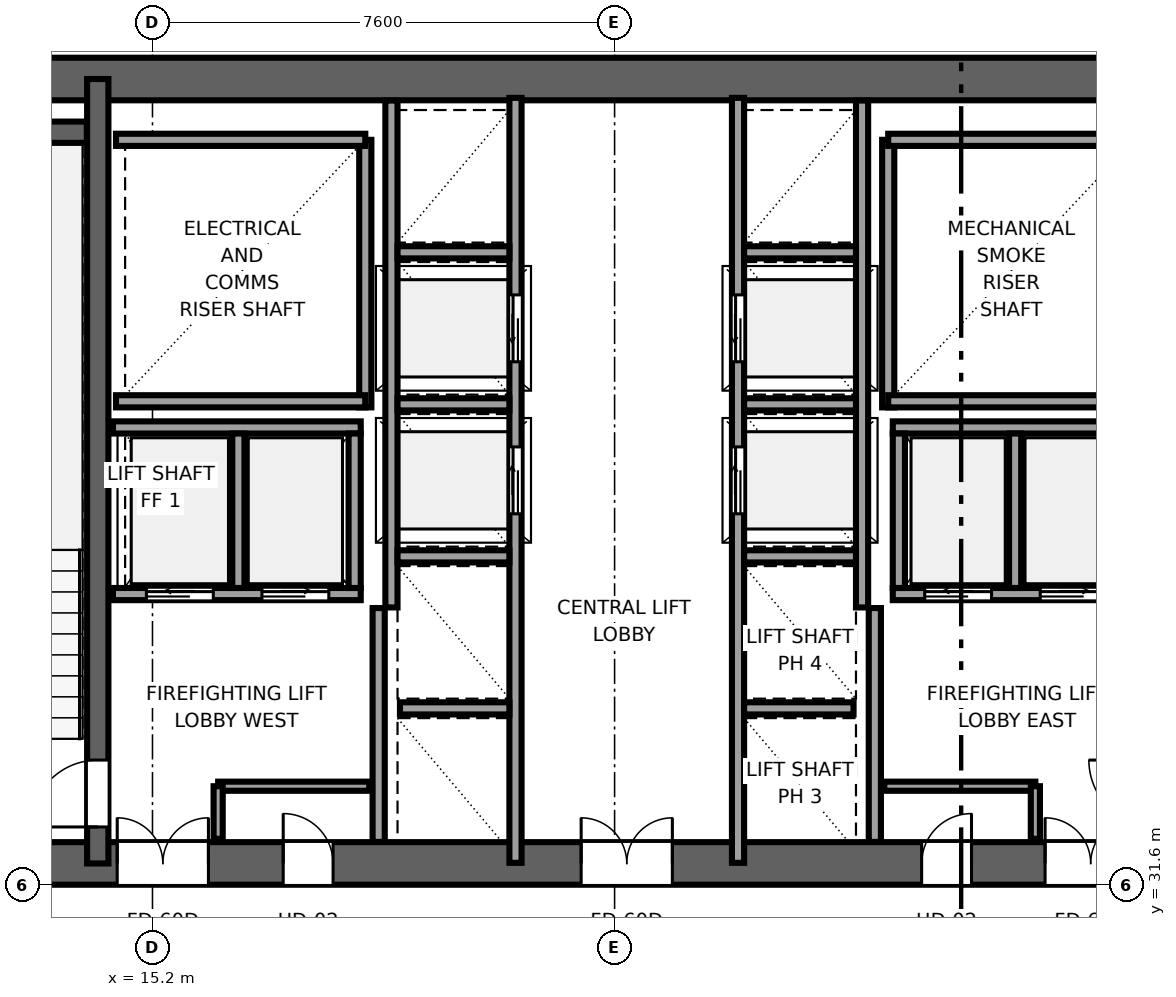
"""IFC4 building model, lengths in metres.
Left out: names, types, materials, properties, quantities, classifications, styles, units other than length and angle.
Written with IfcOpenShell. Run it as: python <this file> out.ifc"""

import sys

from ifc_helpers import new_model, si_unit, direction, frame, frame_2d, origin, place, context, subcontext, project, spatial, rectangle, extrude, source, transform, mapped, element, fill, save


model = new_model("IFC4")
c1 = context("Model", 3, precision=1e-05, world=origin(), true_north=direction((0.0, 1.0)))
c2 = subcontext(c1, "Body", "Model", "MODEL_VIEW")
j1 = project(units=[si_unit("LENGTHUNIT", "METRE"), si_unit("PLANEANGLEUNIT", "RADIAN")], contexts=[c1])
p1 = place(None, origin())
s1 = spatial("IfcSite", under=j1, at=p1, CompositionType="ELEMENT")
p2 = place(p1, origin())
s2 = spatial("IfcBuilding", under=s1, at=p2, CompositionType="ELEMENT")
p3 = place(p2, frame((0.0, 0.0, 136.4)))
s3 = spatial("IfcBuildingStorey", under=s2, at=p3, CompositionType="ELEMENT", Elevation=136.4)
p4 = place(p3, frame((9.8, 31.95, 0.0), z_axis=(0.0, 0.0, 1.0), x_axis=(1.0, 0.0, 0.0)))
e1 = element("IfcWall", 1, at=p4, inside=s3, PredefinedType="SHEAR", context=c2, shape_type="SweptSolid", body=[
    extrude(rectangle(XDim=26.4, YDim=0.7, at=frame_2d((13.2, 0.0))), origin(), (0.0, 0.0, 1.0), 3.55),
])
p5 = place(p4, frame((6.32, 0.0, 0.0), z_axis=(0.0, 0.0, 1.0), x_axis=(-1.0, 0.0, 0.0)))
e2 = element("IfcOpeningElement", 2, at=p5, cuts=e1, PredefinedType="OPENING", context=c2, shape_type="SweptSolid", body=[
    extrude(rectangle(XDim=1.5, YDim=2.04, at=frame_2d((0.75, 1.02))), frame((0.0, 0.36, 0.0), z_axis=(0.0, -1.0, 0.0), x_axis=(1.0, 0.0, 0.0)), (0.0, 0.0, 1.0), 0.72),
])
p6 = place(p4, frame((13.95, 0.0, 0.0), z_axis=(0.0, 0.0, 1.0), x_axis=(-1.0, 0.0, 0.0)))
e3 = element("IfcOpeningElement", 3, at=p6, cuts=e1, PredefinedType="OPENING", context=c2, shape_type="SweptSolid", body=[
    extrude(rectangle(XDim=1.5, YDim=2.04, at=frame_2d((0.75, 1.02))), frame((0.0, 0.36, 0.0), z_axis=(0.0, -1.0, 0.0), x_axis=(1.0, 0.0, 0.0)), (0.0, 0.0, 1.0), 0.72),
])
p7 = place(p4, frame((21.58, 0.0, 0.0), z_axis=(0.0, 0.0, 1.0), x_axis=(-1.0, 0.0, 0.0)))
e4 = element("IfcOpeningElement", 4, at=p7, cuts=e1, PredefinedType="OPENING", context=c2, shape_type="SweptSolid", body=[
    extrude(rectangle(XDim=1.5, YDim=2.04, at=frame_2d((0.75, 1.02))), frame((0.0, 0.36, 0.0), z_axis=(0.0, -1.0, 0.0), x_axis=(1.0, 0.0, 0.0)), (0.0, 0.0, 1.0), 0.72),
])
p8 = place(p4, frame((8.37, 0.0, 0.0), z_axis=(0.0, 0.0, 1.0), x_axis=(-1.0, 0.0, 0.0)))
e5 = element("IfcOpeningElement", 5, at=p8, cuts=e1, PredefinedType="OPENING", context=c2, shape_type="SweptSolid", body=[
    extrude(rectangle(XDim=0.82, YDim=2.01, at=frame_2d((0.41, 1.005))), frame((0.0, 0.36, 0.0), z_axis=(0.0, -1.0, 0.0), x_axis=(1.0, 0.0, 0.0)), (0.0, 0.0, 1.0), 0.72),
])
p9 = place(p4, frame((18.87, 0.0, 0.0), z_axis=(0.0, 0.0, 1.0), x_axis=(-1.0, 0.0, 0.0)))
e6 = element("IfcOpeningElement", 6, at=p9, cuts=e1, PredefinedType="OPENING", context=c2, shape_type="SweptSolid", body=[
    extrude(rectangle(XDim=0.82, YDim=2.01, at=frame_2d((0.41, 1.005))), frame((0.0, 0.36, 0.0), z_axis=(0.0, -1.0, 0.0), x_axis=(1.0, 0.0, 0.0)), (0.0, 0.0, 1.0), 0.72),
])
p10 = place(p3, frame((9.8, 44.85, 0.0), z_axis=(0.0, 0.0, 1.0), x_axis=(1.0, 0.0, 0.0)))
e7 = element("IfcWall", 7, at=p10, inside=s3, PredefinedType="SHEAR", context=c2, shape_type="SweptSolid", body=[
    extrude(rectangle(XDim=26.4, YDim=0.7, at=frame_2d((13.2, 0.0))), origin(), (0.0, 0.0, 1.0), 3.55),
])
p11 = place(p3, frame((14.3, 31.95, 0.0), z_axis=(0.0, 0.0, 1.0), x_axis=(0.0, 1.0, 0.0)))
e8 = element("IfcWall", 8, at=p11, inside=s3, PredefinedType="SHEAR", context=c2, shape_type="SweptSolid", body=[
    extrude(rectangle(XDim=12.9, YDim=0.35, at=frame_2d((6.45, 0.0))), origin(), (0.0, 0.0, 1.0), 3.55),
])
p12 = place(p11, frame((0.6, 0.0, 0.0)))
e9 = element("IfcOpeningElement", 9, at=p12, cuts=e8, PredefinedType="OPENING", context=c2, shape_type="SweptSolid", body=[
    extrude(rectangle(XDim=1.1, YDim=2.12, at=frame_2d((0.55, 1.06))), frame((0.0, 0.185, 0.0), z_axis=(0.0, -1.0, 0.0), x_axis=(1.0, 0.0, 0.0)), (0.0, 0.0, 1.0), 0.37),
])
p13 = place(p3, frame((10.52, 43.975, 0.0), z_axis=(0.0, 0.0, 1.0), x_axis=(1.0, 0.0, 0.0)))
e10 = element("IfcWall", 10, at=p13, inside=s3, PredefinedType="SHEAR", context=c2, shape_type="SweptSolid", body=[
    extrude(rectangle(XDim=3.6, YDim=0.35, at=frame_2d((1.8, 0.0))), origin(), (0.0, 0.0, 1.0), 3.55),
])
p14 = place(p3, frame((18.7, 39.45, 0.0), z_axis=(0.0, 0.0, 1.0), x_axis=(0.0, 1.0, 0.0)))
e11 = element("IfcWall", 11, at=p14, inside=s3, PredefinedType="SOLIDWALL", context=c2, shape_type="SweptSolid", body=[
    extrude(rectangle(XDim=4.4, YDim=0.2, at=frame_2d((2.2, 0.0))), origin(), (0.0, 0.0, 1.0), 3.37),
])
for number, where, z_axis, x_axis in (
    (12, (14.6, 39.55, 0.0), (0.0, 0.0, 1.0), (1.0, 0.0, 0.0)),
    (13, (14.6, 43.85, 0.0), (0.0, 0.0, 1.0), (1.0, 0.0, 0.0)),
):
    element("IfcWall", number, at=place(p3, frame(where, z_axis=z_axis, x_axis=x_axis)), inside=s3, PredefinedType="SOLIDWALL", context=c2, shape_type="SweptSolid", body=[
        extrude(rectangle(XDim=4.1, YDim=0.2, at=frame_2d((2.05, 0.0))), origin(), (0.0, 0.0, 1.0), 3.37),
    ])
p15 = place(p3, frame((27.3, 39.45, 0.0), z_axis=(0.0, 0.0, 1.0), x_axis=(0.0, 1.0, 0.0)))
e14 = element("IfcWall", 14, at=p15, inside=s3, PredefinedType="SOLIDWALL", context=c2, shape_type="SweptSolid", body=[
    extrude(rectangle(XDim=4.4, YDim=0.2, at=frame_2d((2.2, 0.0))), origin(), (0.0, 0.0, 1.0), 3.37),
])
for number, where, z_axis, x_axis in (
    (15, (27.3, 39.55, 0.0), (0.0, 0.0, 1.0), (1.0, 0.0, 0.0)),
    (16, (27.3, 43.85, 0.0), (0.0, 0.0, 1.0), (1.0, 0.0, 0.0)),
):
    element("IfcWall", number, at=place(p3, frame(where, z_axis=z_axis, x_axis=x_axis)), inside=s3, PredefinedType="SOLIDWALL", context=c2, shape_type="SweptSolid", body=[
        extrude(rectangle(XDim=4.1, YDim=0.2, at=frame_2d((2.05, 0.0))), origin(), (0.0, 0.0, 1.0), 3.37),
    ])
for number, where, z_axis, x_axis in (
    (17, (18.92, 32.304, 0.0), (0.0, 0.0, 1.0), (0.0, 1.0, 0.0)),
    (18, (27.08, 32.304, 0.0), (0.0, 0.0, 1.0), (0.0, 1.0, 0.0)),
):
    element("IfcWall", number, at=place(p3, frame(where, z_axis=z_axis, x_axis=x_axis)), inside=s3, PredefinedType="SOLIDWALL", context=c2, shape_type="SweptSolid", body=[
        extrude(rectangle(XDim=3.846, YDim=0.2, at=frame_2d((1.923, 0.0))), origin(), (0.0, 0.0, 1.0), 3.37),
    ])
p16 = place(p3, frame((21.17, 31.96, 0.0), z_axis=(0.0, 0.0, 1.0), x_axis=(0.0, 1.0, 0.0)))
e19 = element("IfcWall", 19, at=p16, inside=s3, PredefinedType="SOLIDWALL", context=c2, shape_type="SweptSolid", body=[
    extrude(rectangle(XDim=12.58, YDim=0.2, at=frame_2d((6.29, 0.0))), origin(), (0.0, 0.0, 1.0), 3.37),
])
p17 = place(p16, frame((5.74, 0.0, 0.0)))
e20 = element("IfcOpeningElement", 20, at=p17, cuts=e19, PredefinedType="OPENING", context=c2, shape_type="SweptSolid", body=[
    extrude(rectangle(XDim=1.1, YDim=2.12, at=frame_2d((0.55, 1.06))), frame((0.0, 0.11, 0.0), z_axis=(0.0, -1.0, 0.0), x_axis=(1.0, 0.0, 0.0)), (0.0, 0.0, 1.0), 0.22),
])
p18 = place(p16, frame((8.24, 0.0, 0.0)))
e21 = element("IfcOpeningElement", 21, at=p18, cuts=e19, PredefinedType="OPENING", context=c2, shape_type="SweptSolid", body=[
    extrude(rectangle(XDim=1.1, YDim=2.12, at=frame_2d((0.55, 1.06))), frame((0.0, 0.11, 0.0), z_axis=(0.0, -1.0, 0.0), x_axis=(1.0, 0.0, 0.0)), (0.0, 0.0, 1.0), 0.22),
])
p19 = place(p3, frame((19.13, 36.16, 0.0), z_axis=(0.0, 0.0, 1.0), x_axis=(0.0, 1.0, 0.0)))
e22 = element("IfcWall", 22, at=p19, inside=s3, PredefinedType="SOLIDWALL", context=c2, shape_type="SweptSolid", body=[
    extrude(rectangle(XDim=8.336, YDim=0.2, at=frame_2d((4.168, 0.0))), origin(), (0.0, 0.0, 1.0), 3.37),
])
p20 = place(p3, frame((19.27, 34.5, 0.0), z_axis=(0.0, 0.0, 1.0), x_axis=(1.0, 0.0, 0.0)))
e23 = element("IfcWall", 23, at=p20, inside=s3, PredefinedType="SOLIDWALL", context=c2, shape_type="SweptSolid", body=[
    extrude(rectangle(XDim=1.8, YDim=0.2, at=frame_2d((0.9, 0.0))), origin(), (0.0, 0.0, 1.0), 3.37),
])
for number, where, z_axis, x_axis in (
    (24, (19.23, 37.0, 0.0), (0.0, 0.0, 1.0), (1.0, 0.0, 0.0)),
    (25, (19.23, 39.5, 0.0), (0.0, 0.0, 1.0), (1.0, 0.0, 0.0)),
    (26, (19.23, 42.0, 0.0), (0.0, 0.0, 1.0), (1.0, 0.0, 0.0)),
):
    element("IfcWall", number, at=place(p3, frame(where, z_axis=z_axis, x_axis=x_axis)), inside=s3, PredefinedType="SOLIDWALL", context=c2, shape_type="SweptSolid", body=[
        extrude(rectangle(XDim=1.84, YDim=0.2, at=frame_2d((0.92, 0.0))), origin(), (0.0, 0.0, 1.0), 3.37),
    ])
p21 = place(p3, frame((27.375, 36.38, 0.0), z_axis=(0.0, 0.0, 1.0), x_axis=(1.0, 0.0, 0.0)))
e27 = element("IfcWall", 27, at=p21, inside=s3, PredefinedType="SOLIDWALL", context=c2, shape_type="SweptSolid", body=[
    extrude(rectangle(XDim=4.075, YDim=0.2, at=frame_2d((2.038, 0.0))), origin(), (0.0, 0.0, 1.0), 3.37),
])
p22 = place(p21, frame((0.525, 0.0, 0.0)))
e28 = element("IfcOpeningElement", 28, at=p22, cuts=e27, PredefinedType="OPENING", context=c2, shape_type="SweptSolid", body=[
    extrude(rectangle(XDim=1.1, YDim=2.12, at=frame_2d((0.55, 1.06))), frame((0.0, 0.11, 0.0), z_axis=(0.0, -1.0, 0.0), x_axis=(1.0, 0.0, 0.0)), (0.0, 0.0, 1.0), 0.22),
])
p23 = place(p21, frame((2.425, 0.0, 0.0)))
e29 = element("IfcOpeningElement", 29, at=p23, cuts=e27, PredefinedType="OPENING", context=c2, shape_type="SweptSolid", body=[
    extrude(rectangle(XDim=1.1, YDim=2.12, at=frame_2d((0.55, 1.06))), frame((0.0, 0.11, 0.0), z_axis=(0.0, -1.0, 0.0), x_axis=(1.0, 0.0, 0.0)), (0.0, 0.0, 1.0), 0.22),
])
p24 = place(p3, frame((27.375, 39.12, 0.0), z_axis=(0.0, 0.0, 1.0), x_axis=(1.0, 0.0, 0.0)))
e30 = element("IfcWall", 30, at=p24, inside=s3, PredefinedType="SOLIDWALL", context=c2, shape_type="SweptSolid", body=[
    extrude(rectangle(XDim=4.075, YDim=0.2, at=frame_2d((2.038, 0.0))), origin(), (0.0, 0.0, 1.0), 3.37),
])
for number, where, z_axis, x_axis in (
    (31, (27.475, 36.48, 0.0), (0.0, 0.0, 1.0), (0.0, 1.0, 0.0)),
    (32, (29.387, 36.48, 0.0), (0.0, 0.0, 1.0), (0.0, 1.0, 0.0)),
):
    element("IfcWall", number, at=place(p3, frame(where, z_axis=z_axis, x_axis=x_axis)), inside=s3, PredefinedType="SOLIDWALL", context=c2, shape_type="SweptSolid", body=[
        extrude(rectangle(XDim=2.54, YDim=0.2, at=frame_2d((1.27, 0.0))), origin(), (0.0, 0.0, 1.0), 3.37),
    ])
p25 = place(p3, frame((14.55, 36.38, 0.0), z_axis=(0.0, 0.0, 1.0), x_axis=(1.0, 0.0, 0.0)))
e33 = element("IfcWall", 33, at=p25, inside=s3, PredefinedType="SOLIDWALL", context=c2, shape_type="SweptSolid", body=[
    extrude(rectangle(XDim=4.075, YDim=0.2, at=frame_2d((2.038, 0.0))), origin(), (0.0, 0.0, 1.0), 3.37),
])
p26 = place(p25, frame((0.55, 0.0, 0.0)))
e34 = element("IfcOpeningElement", 34, at=p26, cuts=e33, PredefinedType="OPENING", context=c2, shape_type="SweptSolid", body=[
    extrude(rectangle(XDim=1.1, YDim=2.12, at=frame_2d((0.55, 1.06))), frame((0.0, 0.11, 0.0), z_axis=(0.0, -1.0, 0.0), x_axis=(1.0, 0.0, 0.0)), (0.0, 0.0, 1.0), 0.22),
])
p27 = place(p25, frame((2.45, 0.0, 0.0)))
e35 = element("IfcOpeningElement", 35, at=p27, cuts=e33, PredefinedType="OPENING", context=c2, shape_type="SweptSolid", body=[
    extrude(rectangle(XDim=1.1, YDim=2.12, at=frame_2d((0.55, 1.06))), frame((0.0, 0.11, 0.0), z_axis=(0.0, -1.0, 0.0), x_axis=(1.0, 0.0, 0.0)), (0.0, 0.0, 1.0), 0.22),
])
p28 = place(p3, frame((14.55, 39.12, 0.0), z_axis=(0.0, 0.0, 1.0), x_axis=(1.0, 0.0, 0.0)))
e36 = element("IfcWall", 36, at=p28, inside=s3, PredefinedType="SOLIDWALL", context=c2, shape_type="SweptSolid", body=[
    extrude(rectangle(XDim=4.075, YDim=0.2, at=frame_2d((2.038, 0.0))), origin(), (0.0, 0.0, 1.0), 3.37),
])
for number, where, z_axis, x_axis in (
    (37, (18.525, 36.48, 0.0), (0.0, 0.0, 1.0), (0.0, 1.0, 0.0)),
    (38, (16.613, 36.48, 0.0), (0.0, 0.0, 1.0), (0.0, 1.0, 0.0)),
):
    element("IfcWall", number, at=place(p3, frame(where, z_axis=z_axis, x_axis=x_axis)), inside=s3, PredefinedType="SOLIDWALL", context=c2, shape_type="SweptSolid", body=[
        extrude(rectangle(XDim=2.54, YDim=0.2, at=frame_2d((1.27, 0.0))), origin(), (0.0, 0.0, 1.0), 3.37),
    ])
p29 = place(p3, frame((24.83, 31.96, 0.0), z_axis=(0.0, 0.0, 1.0), x_axis=(0.0, 1.0, 0.0)))
e39 = element("IfcWall", 39, at=p29, inside=s3, PredefinedType="SOLIDWALL", context=c2, shape_type="SweptSolid", body=[
    extrude(rectangle(XDim=12.58, YDim=0.2, at=frame_2d((6.29, 0.0))), origin(), (0.0, 0.0, 1.0), 3.37),
])
p30 = place(p29, frame((5.74, 0.0, 0.0)))
e40 = element("IfcOpeningElement", 40, at=p30, cuts=e39, PredefinedType="OPENING", context=c2, shape_type="SweptSolid", body=[
    extrude(rectangle(XDim=1.1, YDim=2.12, at=frame_2d((0.55, 1.06))), frame((0.0, 0.11, 0.0), z_axis=(0.0, -1.0, 0.0), x_axis=(1.0, 0.0, 0.0)), (0.0, 0.0, 1.0), 0.22),
])
p31 = place(p29, frame((8.24, 0.0, 0.0)))
e41 = element("IfcOpeningElement", 41, at=p31, cuts=e39, PredefinedType="OPENING", context=c2, shape_type="SweptSolid", body=[
    extrude(rectangle(XDim=1.1, YDim=2.12, at=frame_2d((0.55, 1.06))), frame((0.0, 0.11, 0.0), z_axis=(0.0, -1.0, 0.0), x_axis=(1.0, 0.0, 0.0)), (0.0, 0.0, 1.0), 0.22),
])
p32 = place(p3, frame((26.87, 36.16, 0.0), z_axis=(0.0, 0.0, 1.0), x_axis=(0.0, 1.0, 0.0)))
e42 = element("IfcWall", 42, at=p32, inside=s3, PredefinedType="SOLIDWALL", context=c2, shape_type="SweptSolid", body=[
    extrude(rectangle(XDim=8.336, YDim=0.2, at=frame_2d((4.168, 0.0))), origin(), (0.0, 0.0, 1.0), 3.37),
])
p33 = place(p3, frame((24.93, 34.5, 0.0), z_axis=(0.0, 0.0, 1.0), x_axis=(1.0, 0.0, 0.0)))
e43 = element("IfcWall", 43, at=p33, inside=s3, PredefinedType="SOLIDWALL", context=c2, shape_type="SweptSolid", body=[
    extrude(rectangle(XDim=1.8, YDim=0.2, at=frame_2d((0.9, 0.0))), origin(), (0.0, 0.0, 1.0), 3.37),
])
for number, where, z_axis, x_axis in (
    (44, (24.93, 37.0, 0.0), (0.0, 0.0, 1.0), (1.0, 0.0, 0.0)),
    (45, (24.93, 39.5, 0.0), (0.0, 0.0, 1.0), (1.0, 0.0, 0.0)),
    (46, (24.93, 42.0, 0.0), (0.0, 0.0, 1.0), (1.0, 0.0, 0.0)),
):
    element("IfcWall", number, at=place(p3, frame(where, z_axis=z_axis, x_axis=x_axis)), inside=s3, PredefinedType="SOLIDWALL", context=c2, shape_type="SweptSolid", body=[
        extrude(rectangle(XDim=1.84, YDim=0.2, at=frame_2d((0.92, 0.0))), origin(), (0.0, 0.0, 1.0), 3.37),
    ])
p34 = place(p3, frame((16.28, 33.22, 0.0), z_axis=(0.0, 0.0, 1.0), x_axis=(1.0, 0.0, 0.0)))
e47 = element("IfcWall", 47, at=p34, inside=s3, PredefinedType="PARTITIONING", context=c2, shape_type="SweptSolid", body=[
    extrude(rectangle(XDim=2.485, YDim=0.15, at=frame_2d((1.242, 0.0))), origin(), (0.0, 0.0, 1.0), 3.37),
])
p35 = place(p3, frame((16.28, 32.355, 0.0), z_axis=(0.0, 0.0, 1.0), x_axis=(0.0, 1.0, 0.0)))
e48 = element("IfcWall", 48, at=p35, inside=s3, PredefinedType="PARTITIONING", context=c2, shape_type="SweptSolid", body=[
    extrude(rectangle(XDim=0.865, YDim=0.15, at=frame_2d((0.433, 0.0))), origin(), (0.0, 0.0, 1.0), 3.37),
])
p36 = place(p3, frame((27.235, 33.22, 0.0), z_axis=(0.0, 0.0, 1.0), x_axis=(1.0, 0.0, 0.0)))
e49 = element("IfcWall", 49, at=p36, inside=s3, PredefinedType="PARTITIONING", context=c2, shape_type="SweptSolid", body=[
    extrude(rectangle(XDim=2.485, YDim=0.15, at=frame_2d((1.242, 0.0))), origin(), (0.0, 0.0, 1.0), 3.37),
])
p37 = place(p3, frame((29.72, 32.355, 0.0), z_axis=(0.0, 0.0, 1.0), x_axis=(0.0, 1.0, 0.0)))
e50 = element("IfcWall", 50, at=p37, inside=s3, PredefinedType="PARTITIONING", context=c2, shape_type="SweptSolid", body=[
    extrude(rectangle(XDim=0.865, YDim=0.15, at=frame_2d((0.433, 0.0))), origin(), (0.0, 0.0, 1.0), 3.37),
])
m1 = source(origin(), c2, "Body", "SweptSolid", [
    extrude(rectangle(XDim=1.1, YDim=2.12, at=frame_2d((0.55, 1.06))), frame((0.0, 0.025, 0.0), z_axis=(0.0, -1.0, 0.0), x_axis=(1.0, 0.0, 0.0)), (0.0, 0.0, 1.0), 0.05),
])
p38 = place(p12, origin())
e51 = element("IfcDoor", 51, at=p38, inside=s3, OperationType="SINGLE_SWING_LEFT", PredefinedType="DOOR", context=c2, shape_type="MappedRepresentation", body=[
    mapped(m1, transform((0.0, 0.0, 0.0), x_axis=(1.0, 0.0, 0.0), y_axis=(0.0, 1.0, 0.0), z_axis=(0.0, 0.0, 1.0), scale=1.0)),
])
fill(e9, e51)
m2 = source(origin(), c2, "Body", "SweptSolid", [
    extrude(rectangle(XDim=1.5, YDim=2.04, at=frame_2d((0.75, 1.02))), frame((0.0, 0.025, 0.0), z_axis=(0.0, -1.0, 0.0), x_axis=(1.0, 0.0, 0.0)), (0.0, 0.0, 1.0), 0.05),
])
p39 = place(p5, origin())
e52 = element("IfcDoor", 52, at=p39, inside=s3, OperationType="DOUBLE_DOOR_SINGLE_SWING", PredefinedType="DOOR", context=c2, shape_type="MappedRepresentation", body=[
    mapped(m2, transform((0.0, 0.0, 0.0), x_axis=(1.0, 0.0, 0.0), y_axis=(0.0, 1.0, 0.0), z_axis=(0.0, 0.0, 1.0), scale=1.0)),
])
fill(e2, e52)
p40 = place(p6, origin())
e53 = element("IfcDoor", 53, at=p40, inside=s3, OperationType="DOUBLE_DOOR_SINGLE_SWING", PredefinedType="DOOR", context=c2, shape_type="MappedRepresentation", body=[
    mapped(m2, transform((0.0, 0.0, 0.0), x_axis=(1.0, 0.0, 0.0), y_axis=(0.0, 1.0, 0.0), z_axis=(0.0, 0.0, 1.0), scale=1.0)),
])
fill(e3, e53)
p41 = place(p7, origin())
e54 = element("IfcDoor", 54, at=p41, inside=s3, OperationType="DOUBLE_DOOR_SINGLE_SWING", PredefinedType="DOOR", context=c2, shape_type="MappedRepresentation", body=[
    mapped(m2, transform((0.0, 0.0, 0.0), x_axis=(1.0, 0.0, 0.0), y_axis=(0.0, 1.0, 0.0), z_axis=(0.0, 0.0, 1.0), scale=1.0)),
])
fill(e4, e54)
m3 = source(origin(), c2, "Body", "SweptSolid", [
    extrude(rectangle(XDim=0.82, YDim=2.01, at=frame_2d((0.41, 1.005))), frame((0.0, 0.025, 0.0), z_axis=(0.0, -1.0, 0.0), x_axis=(1.0, 0.0, 0.0)), (0.0, 0.0, 1.0), 0.05),
])
p42 = place(p8, origin())
e55 = element("IfcDoor", 55, at=p42, inside=s3, OperationType="SINGLE_SWING_LEFT", PredefinedType="DOOR", context=c2, shape_type="MappedRepresentation", body=[
    mapped(m3, transform((0.0, 0.0, 0.0), x_axis=(1.0, 0.0, 0.0), y_axis=(0.0, 1.0, 0.0), z_axis=(0.0, 0.0, 1.0), scale=1.0)),
])
fill(e5, e55)
p43 = place(p9, origin())
e56 = element("IfcDoor", 56, at=p43, inside=s3, OperationType="SINGLE_SWING_RIGHT", PredefinedType="DOOR", context=c2, shape_type="MappedRepresentation", body=[
    mapped(m3, transform((0.0, 0.0, 0.0), x_axis=(1.0, 0.0, 0.0), y_axis=(0.0, 1.0, 0.0), z_axis=(0.0, 0.0, 1.0), scale=1.0)),
])
fill(e6, e56)
m4 = source(origin(), c2, "Body", "SweptSolid", [
    extrude(rectangle(XDim=1.1, YDim=2.12, at=frame_2d((0.55, 1.06))), frame((0.0, 0.025, 0.0), z_axis=(0.0, -1.0, 0.0), x_axis=(1.0, 0.0, 0.0)), (0.0, 0.0, 1.0), 0.05),
])
p44 = place(p17, origin())
e57 = element("IfcDoor", 57, at=p44, inside=s3, OperationType="SLIDING_TO_RIGHT", PredefinedType="DOOR", context=c2, shape_type="MappedRepresentation", body=[
    mapped(m4, transform((0.0, 0.0, 0.0), x_axis=(1.0, 0.0, 0.0), y_axis=(0.0, 1.0, 0.0), z_axis=(0.0, 0.0, 1.0), scale=1.0)),
])
fill(e20, e57)
p45 = place(p18, origin())
e58 = element("IfcDoor", 58, at=p45, inside=s3, OperationType="SLIDING_TO_LEFT", PredefinedType="DOOR", context=c2, shape_type="MappedRepresentation", body=[
    mapped(m4, transform((0.0, 0.0, 0.0), x_axis=(1.0, 0.0, 0.0), y_axis=(0.0, 1.0, 0.0), z_axis=(0.0, 0.0, 1.0), scale=1.0)),
])
fill(e21, e58)
p46 = place(p22, origin())
e59 = element("IfcDoor", 59, at=p46, inside=s3, OperationType="SLIDING_TO_LEFT", PredefinedType="DOOR", context=c2, shape_type="MappedRepresentation", body=[
    mapped(m4, transform((0.0, 0.0, 0.0), x_axis=(1.0, 0.0, 0.0), y_axis=(0.0, 1.0, 0.0), z_axis=(0.0, 0.0, 1.0), scale=1.0)),
])
fill(e28, e59)
p47 = place(p23, origin())
e60 = element("IfcDoor", 60, at=p47, inside=s3, OperationType="SLIDING_TO_RIGHT", PredefinedType="DOOR", context=c2, shape_type="MappedRepresentation", body=[
    mapped(m4, transform((0.0, 0.0, 0.0), x_axis=(1.0, 0.0, 0.0), y_axis=(0.0, 1.0, 0.0), z_axis=(0.0, 0.0, 1.0), scale=1.0)),
])
fill(e29, e60)
p48 = place(p26, origin())
e61 = element("IfcDoor", 61, at=p48, inside=s3, OperationType="SLIDING_TO_LEFT", PredefinedType="DOOR", context=c2, shape_type="MappedRepresentation", body=[
    mapped(m4, transform((0.0, 0.0, 0.0), x_axis=(1.0, 0.0, 0.0), y_axis=(0.0, 1.0, 0.0), z_axis=(0.0, 0.0, 1.0), scale=1.0)),
])
fill(e34, e61)
p49 = place(p27, origin())
e62 = element("IfcDoor", 62, at=p49, inside=s3, OperationType="SLIDING_TO_RIGHT", PredefinedType="DOOR", context=c2, shape_type="MappedRepresentation", body=[
    mapped(m4, transform((0.0, 0.0, 0.0), x_axis=(1.0, 0.0, 0.0), y_axis=(0.0, 1.0, 0.0), z_axis=(0.0, 0.0, 1.0), scale=1.0)),
])
fill(e35, e62)
p50 = place(p30, origin())
e63 = element("IfcDoor", 63, at=p50, inside=s3, OperationType="SLIDING_TO_RIGHT", PredefinedType="DOOR", context=c2, shape_type="MappedRepresentation", body=[
    mapped(m4, transform((0.0, 0.0, 0.0), x_axis=(1.0, 0.0, 0.0), y_axis=(0.0, 1.0, 0.0), z_axis=(0.0, 0.0, 1.0), scale=1.0)),
])
fill(e40, e63)
p51 = place(p31, origin())
e64 = element("IfcDoor", 64, at=p51, inside=s3, OperationType="SLIDING_TO_LEFT", PredefinedType="DOOR", context=c2, shape_type="MappedRepresentation", body=[
    mapped(m4, transform((0.0, 0.0, 0.0), x_axis=(1.0, 0.0, 0.0), y_axis=(0.0, 1.0, 0.0), z_axis=(0.0, 0.0, 1.0), scale=1.0)),
])
fill(e41, e64)
save(model, sys.argv[1])
